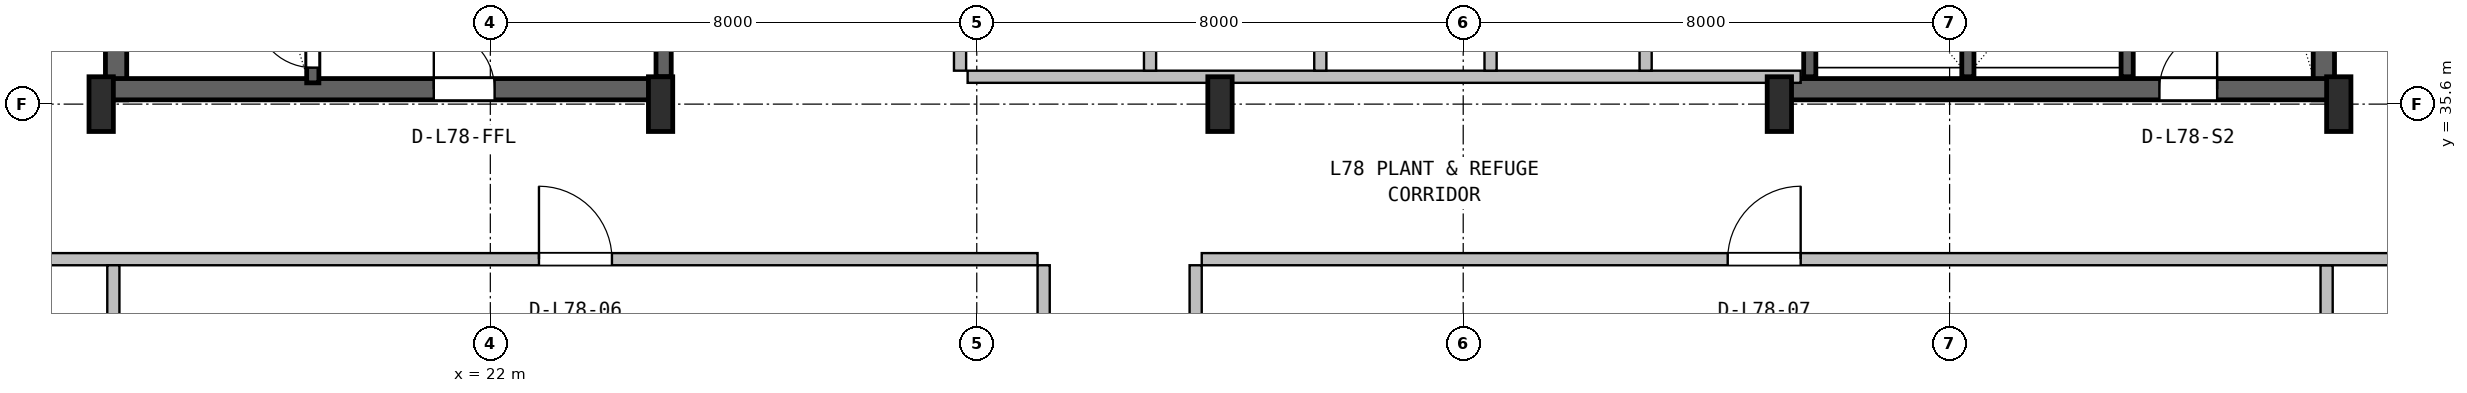
"""IFC4 building model, lengths in metres.
Left out: names, types, materials, properties, quantities, classifications, styles, units other than length and angle.
Written with IfcOpenShell. Run it as: python <this file> out.ifc"""

import sys

from ifc_helpers import new_model, si_unit, direction, frame, frame_2d, origin, origin_2d, place, context, subcontext, project, spatial, rectangle, i_section, extrude, source, transform, mapped, element, fill, save


model = new_model("IFC4")
c1 = context("Model", 3, precision=1e-05, world=origin(), true_north=direction((0.0, 1.0)))
c2 = subcontext(c1, "Body", "Model", "MODEL_VIEW")
j1 = project(units=[si_unit("LENGTHUNIT", "METRE"), si_unit("PLANEANGLEUNIT", "RADIAN")], contexts=[c1])
p1 = place(None, origin())
s1 = spatial("IfcSite", under=j1, at=p1, CompositionType="ELEMENT")
p2 = place(p1, origin())
s2 = spatial("IfcBuilding", under=s1, at=p2, CompositionType="ELEMENT")
p3 = place(p2, frame((0.0, 0.0, 314.6)))
s3 = spatial("IfcBuildingStorey", under=s2, at=p3, CompositionType="ELEMENT", Elevation=314.6)
for number, where, z_axis, x_axis in (
    (1, (15.845, 35.67, 0.0), (0.0, 0.0, 1.0), (0.0, 1.0, 0.0)),
    (2, (52.155, 35.67, 0.0), (0.0, 0.0, 1.0), (0.0, 1.0, 0.0)),
):
    element("IfcWall", number, at=place(p3, frame(where, z_axis=z_axis, x_axis=x_axis)), inside=s3, PredefinedType="SHEAR", context=c2, shape_type="SweptSolid", body=[
        extrude(rectangle(XDim=11.13, YDim=0.35, at=frame_2d((5.565, 0.0))), origin(), (0.0, 0.0, 1.0), 4.75),
    ])
p4 = place(p3, frame((15.67, 35.845, 0.0), z_axis=(0.0, 0.0, 1.0), x_axis=(1.0, 0.0, 0.0)))
e3 = element("IfcWall", 3, at=p4, inside=s3, PredefinedType="SHEAR", context=c2, shape_type="SweptSolid", body=[
    extrude(rectangle(XDim=9.13, YDim=0.35, at=frame_2d((4.565, 0.0))), origin(), (0.0, 0.0, 1.0), 4.75),
])
p5 = place(p4, frame((5.4, 0.0, 0.0)))
e4 = element("IfcOpeningElement", 4, at=p5, cuts=e3, PredefinedType="OPENING", context=c2, shape_type="SweptSolid", body=[
    extrude(rectangle(XDim=1.0, YDim=2.1, at=frame_2d((0.5, 1.05))), frame((0.0, 0.185, 0.0), z_axis=(0.0, -1.0, 0.0), x_axis=(1.0, 0.0, 0.0)), (0.0, 0.0, 1.0), 0.37),
])
p6 = place(p3, frame((43.2, 35.845, 0.0), z_axis=(0.0, 0.0, 1.0), x_axis=(1.0, 0.0, 0.0)))
e5 = element("IfcWall", 5, at=p6, inside=s3, PredefinedType="SHEAR", context=c2, shape_type="SweptSolid", body=[
    extrude(rectangle(XDim=9.13, YDim=0.35, at=frame_2d((4.565, 0.0))), origin(), (0.0, 0.0, 1.0), 4.75),
])
p7 = place(p6, frame((6.25, 0.0, 0.0)))
e6 = element("IfcOpeningElement", 6, at=p7, cuts=e5, PredefinedType="OPENING", context=c2, shape_type="SweptSolid", body=[
    extrude(rectangle(XDim=0.95, YDim=2.1, at=frame_2d((0.475, 1.05))), frame((0.0, 0.185, 0.0), z_axis=(0.0, -1.0, 0.0), x_axis=(1.0, 0.0, 0.0)), (0.0, 0.0, 1.0), 0.37),
])
m1 = source(origin(), c2, "Body", "SweptSolid", [
    extrude(i_section(OverallWidth=0.4, OverallDepth=0.9, WebThickness=0.016, FlangeThickness=0.028, FilletRadius=0.016, at=origin_2d()), origin(), (0.0, 0.0, 1.0), 5.2),
])
for number, where, z_axis, x_axis in (
    (7, (15.6, 35.6, 0.0), (0.0, 0.0, 1.0), (1.0, 0.0, 0.0)),
    (8, (24.8, 35.6, 0.0), (0.0, 0.0, 1.0), (1.0, 0.0, 0.0)),
    (9, (34.0, 35.6, 0.0), (0.0, 0.0, 1.0), (1.0, 0.0, 0.0)),
    (10, (43.2, 35.6, 0.0), (0.0, 0.0, 1.0), (1.0, 0.0, 0.0)),
    (11, (52.4, 35.6, 0.0), (0.0, 0.0, 1.0), (1.0, 0.0, 0.0)),
):
    element("IfcColumn", number, at=place(p3, frame(where, z_axis=z_axis, x_axis=x_axis)), inside=s3, PredefinedType="COLUMN", context=c2, shape_type="MappedRepresentation", body=[
        mapped(m1, transform((0.0, 0.0, 0.0), x_axis=(1.0, 0.0, 0.0), y_axis=(0.0, 1.0, 0.0), z_axis=(0.0, 0.0, 1.0), scale=1.0)),
    ])
p8 = place(p3, frame((19.08, 35.95, 0.0), z_axis=(0.0, 0.0, 1.0), x_axis=(0.0, 1.0, 0.0)))
e12 = element("IfcWall", 12, at=p8, inside=s3, PredefinedType="SHEAR", context=c2, shape_type="SweptSolid", body=[
    extrude(rectangle(XDim=9.65, YDim=0.2, at=frame_2d((4.825, 0.0))), origin(), (0.0, 0.0, 1.0), 4.75),
])
p9 = place(p8, frame((0.25, 0.0, 0.0)))
e13 = element("IfcOpeningElement", 13, at=p9, cuts=e12, PredefinedType="OPENING", context=c2, shape_type="SweptSolid", body=[
    extrude(rectangle(XDim=0.95, YDim=2.1, at=frame_2d((0.475, 1.05))), frame((0.0, 0.11, 0.0), z_axis=(0.0, -1.0, 0.0), x_axis=(1.0, 0.0, 0.0)), (0.0, 0.0, 1.0), 0.22),
])
p10 = place(p3, frame((24.85, 36.05, 0.0), z_axis=(0.0, 0.0, 1.0), x_axis=(0.0, 1.0, 0.0)))
e14 = element("IfcWall", 14, at=p10, inside=s3, PredefinedType="SHEAR", context=c2, shape_type="SweptSolid", body=[
    extrude(rectangle(XDim=10.45, YDim=0.25, at=frame_2d((5.225, 0.0))), origin(), (0.0, 0.0, 1.0), 4.75),
])
p11 = place(p3, frame((48.92, 36.05, 0.0), z_axis=(0.0, 0.0, 1.0), x_axis=(0.0, 1.0, 0.0)))
e15 = element("IfcWall", 15, at=p11, inside=s3, PredefinedType="SHEAR", context=c2, shape_type="SweptSolid", body=[
    extrude(rectangle(XDim=10.5, YDim=0.2, at=frame_2d((5.25, 0.0))), origin(), (0.0, 0.0, 1.0), 4.75),
])
for number, where, z_axis, x_axis in (
    (16, (43.7, 36.05, 0.0), (0.0, 0.0, 1.0), (0.0, 1.0, 0.0)),
    (17, (46.3, 36.05, 0.0), (0.0, 0.0, 1.0), (0.0, 1.0, 0.0)),
):
    element("IfcWall", number, at=place(p3, frame(where, z_axis=z_axis, x_axis=x_axis)), inside=s3, PredefinedType="SHEAR", context=c2, shape_type="SweptSolid", body=[
        extrude(rectangle(XDim=3.05, YDim=0.2, at=frame_2d((1.525, 0.0))), origin(), (0.0, 0.0, 1.0), 4.75),
    ])
p12 = place(p3, frame((29.85, 36.05, 0.0), z_axis=(0.0, 0.0, 1.0), x_axis=(1.0, 0.0, 0.0)))
e18 = element("IfcWall", 18, at=p12, inside=s3, PredefinedType="SOLIDWALL", context=c2, shape_type="SweptSolid", body=[
    extrude(rectangle(XDim=13.7, YDim=0.2, at=frame_2d((6.85, 0.0))), origin(), (0.0, 0.0, 1.0), 4.73),
])
for number, where, z_axis, x_axis in (
    (19, (32.85, 36.15, 0.0), (0.0, 0.0, 1.0), (0.0, 1.0, 0.0)),
    (20, (29.725, 36.15, 0.0), (0.0, 0.0, 1.0), (0.0, 1.0, 0.0)),
    (21, (35.65, 36.15, 0.0), (0.0, 0.0, 1.0), (0.0, 1.0, 0.0)),
    (22, (38.45, 36.15, 0.0), (0.0, 0.0, 1.0), (0.0, 1.0, 0.0)),
    (23, (41.0, 36.15, 0.0), (0.0, 0.0, 1.0), (0.0, 1.0, 0.0)),
):
    element("IfcWall", number, at=place(p3, frame(where, z_axis=z_axis, x_axis=x_axis)), inside=s3, PredefinedType="SOLIDWALL", context=c2, shape_type="SweptSolid", body=[
        extrude(rectangle(XDim=3.0, YDim=0.2, at=frame_2d((1.5, 0.0))), origin(), (0.0, 0.0, 1.0), 4.73),
    ])
p13 = place(p3, frame((31.1, 25.85, 0.0), z_axis=(0.0, 0.0, 1.0), x_axis=(0.0, 1.0, 0.0)))
e24 = element("IfcWall", 24, at=p13, inside=s3, PredefinedType="SOLIDWALL", context=c2, shape_type="SweptSolid", body=[
    extrude(rectangle(XDim=7.1, YDim=0.2, at=frame_2d((3.55, 0.0))), origin(), (0.0, 0.0, 1.0), 4.478),
])
p14 = place(p3, frame((12.18, 33.05, 0.0), z_axis=(0.0, 0.0, 1.0), x_axis=(1.0, 0.0, 0.0)))
e25 = element("IfcWall", 25, at=p14, inside=s3, PredefinedType="SOLIDWALL", context=c2, shape_type="SweptSolid", body=[
    extrude(rectangle(XDim=18.82, YDim=0.2, at=frame_2d((9.41, 0.0))), origin(), (0.0, 0.0, 1.0), 3.525),
])
p15 = place(p14, frame((10.62, 0.0, 0.0)))
e26 = element("IfcOpeningElement", 26, at=p15, cuts=e25, PredefinedType="OPENING", context=c2, shape_type="SweptSolid", body=[
    extrude(rectangle(XDim=1.2, YDim=2.1, at=frame_2d((0.6, 1.05))), frame((0.0, 0.11, 0.0), z_axis=(0.0, -1.0, 0.0), x_axis=(1.0, 0.0, 0.0)), (0.0, 0.0, 1.0), 0.22),
])
for number, where, z_axis, x_axis in (
    (27, (15.8, 25.85, 0.0), (0.0, 0.0, 1.0), (0.0, 1.0, 0.0)),
    (28, (52.2, 25.85, 0.0), (0.0, 0.0, 1.0), (0.0, 1.0, 0.0)),
):
    element("IfcWall", number, at=place(p3, frame(where, z_axis=z_axis, x_axis=x_axis)), inside=s3, PredefinedType="SOLIDWALL", context=c2, shape_type="SweptSolid", body=[
        extrude(rectangle(XDim=7.1, YDim=0.2, at=frame_2d((3.55, 0.0))), origin(), (0.0, 0.0, 1.0), 4.478),
    ])
p16 = place(p3, frame((33.7, 33.05, 0.0), z_axis=(0.0, 0.0, 1.0), x_axis=(1.0, 0.0, 0.0)))
e29 = element("IfcWall", 29, at=p16, inside=s3, PredefinedType="SOLIDWALL", context=c2, shape_type="SweptSolid", body=[
    extrude(rectangle(XDim=22.12, YDim=0.2, at=frame_2d((11.06, 0.0))), origin(), (0.0, 0.0, 1.0), 3.525),
])
p17 = place(p16, frame((8.65, 0.0, 0.0)))
e30 = element("IfcOpeningElement", 30, at=p17, cuts=e29, PredefinedType="OPENING", context=c2, shape_type="SweptSolid", body=[
    extrude(rectangle(XDim=1.2, YDim=2.1, at=frame_2d((0.6, 1.05))), frame((0.0, 0.11, 0.0), z_axis=(0.0, -1.0, 0.0), x_axis=(1.0, 0.0, 0.0)), (0.0, 0.0, 1.0), 0.22),
])
p18 = place(p3, frame((33.6, 25.85, 0.0), z_axis=(0.0, 0.0, 1.0), x_axis=(0.0, 1.0, 0.0)))
e31 = element("IfcWall", 31, at=p18, inside=s3, PredefinedType="SOLIDWALL", context=c2, shape_type="SweptSolid", body=[
    extrude(rectangle(XDim=7.1, YDim=0.2, at=frame_2d((3.55, 0.0))), origin(), (0.0, 0.0, 1.0), 4.478),
])
m2 = source(origin(), c2, "Body", "SweptSolid", [
    extrude(rectangle(XDim=0.95, YDim=2.1, at=frame_2d((0.475, 1.05))), frame((0.0, 0.025, 0.0), z_axis=(0.0, -1.0, 0.0), x_axis=(1.0, 0.0, 0.0)), (0.0, 0.0, 1.0), 0.05),
])
p19 = place(p9, origin())
e32 = element("IfcDoor", 32, at=p19, inside=s3, OperationType="SINGLE_SWING_RIGHT", PredefinedType="DOOR", context=c2, shape_type="MappedRepresentation", body=[
    mapped(m2, transform((0.0, 0.0, 0.0), x_axis=(1.0, 0.0, 0.0), y_axis=(0.0, 1.0, 0.0), z_axis=(0.0, 0.0, 1.0), scale=1.0)),
])
fill(e13, e32)
m3 = source(origin(), c2, "Body", "SweptSolid", [
    extrude(rectangle(XDim=1.0, YDim=2.1, at=frame_2d((0.5, 1.05))), frame((0.0, 0.025, 0.0), z_axis=(0.0, -1.0, 0.0), x_axis=(1.0, 0.0, 0.0)), (0.0, 0.0, 1.0), 0.05),
])
p20 = place(p5, origin())
e33 = element("IfcDoor", 33, at=p20, inside=s3, OperationType="SINGLE_SWING_LEFT", PredefinedType="DOOR", context=c2, shape_type="MappedRepresentation", body=[
    mapped(m3, transform((0.0, 0.0, 0.0), x_axis=(1.0, 0.0, 0.0), y_axis=(0.0, 1.0, 0.0), z_axis=(0.0, 0.0, 1.0), scale=1.0)),
])
fill(e4, e33)
p21 = place(p7, origin())
e34 = element("IfcDoor", 34, at=p21, inside=s3, OperationType="SINGLE_SWING_RIGHT", PredefinedType="DOOR", context=c2, shape_type="MappedRepresentation", body=[
    mapped(m2, transform((0.0, 0.0, 0.0), x_axis=(1.0, 0.0, 0.0), y_axis=(0.0, 1.0, 0.0), z_axis=(0.0, 0.0, 1.0), scale=1.0)),
])
fill(e6, e34)
m4 = source(origin(), c2, "Body", "SweptSolid", [
    extrude(rectangle(XDim=1.2, YDim=2.1, at=frame_2d((0.6, 1.05))), frame((0.0, 0.025, 0.0), z_axis=(0.0, -1.0, 0.0), x_axis=(1.0, 0.0, 0.0)), (0.0, 0.0, 1.0), 0.05),
])
p22 = place(p15, origin())
e35 = element("IfcDoor", 35, at=p22, inside=s3, OperationType="SINGLE_SWING_LEFT", PredefinedType="DOOR", context=c2, shape_type="MappedRepresentation", body=[
    mapped(m4, transform((0.0, 0.0, 0.0), x_axis=(1.0, 0.0, 0.0), y_axis=(0.0, 1.0, 0.0), z_axis=(0.0, 0.0, 1.0), scale=1.0)),
])
fill(e26, e35)
p23 = place(p17, origin())
e36 = element("IfcDoor", 36, at=p23, inside=s3, OperationType="SINGLE_SWING_RIGHT", PredefinedType="DOOR", context=c2, shape_type="MappedRepresentation", body=[
    mapped(m4, transform((0.0, 0.0, 0.0), x_axis=(1.0, 0.0, 0.0), y_axis=(0.0, 1.0, 0.0), z_axis=(0.0, 0.0, 1.0), scale=1.0)),
])
fill(e30, e36)
save(model, sys.argv[1])
